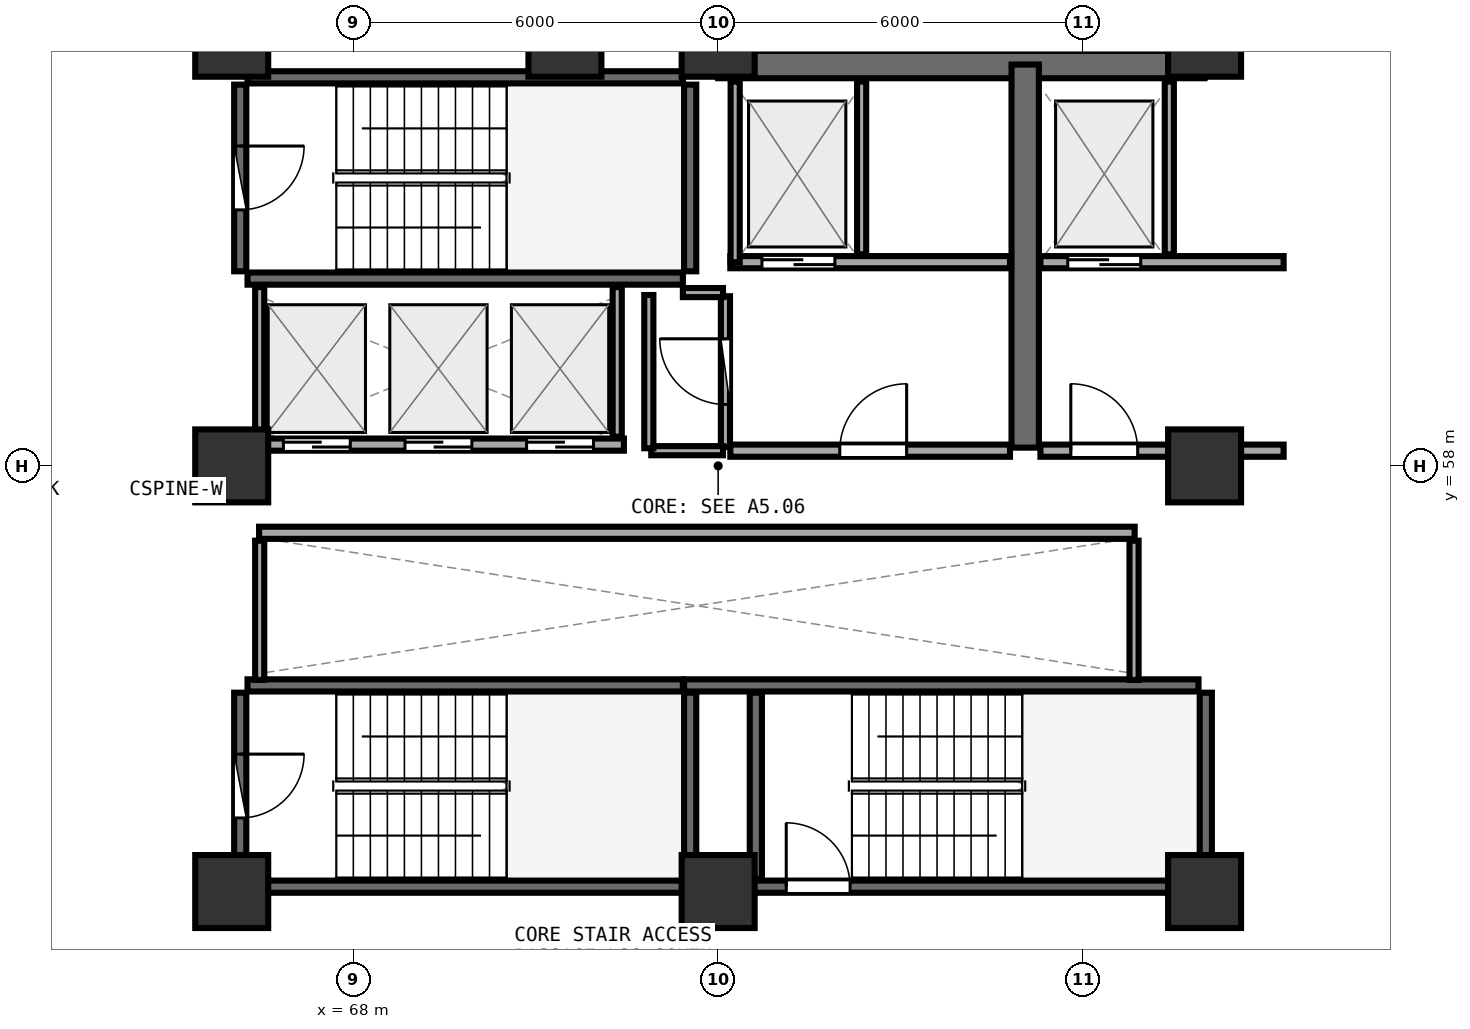
"""IFC4 building model, lengths in metres.
Left out: names, types, materials, properties, quantities, classifications, styles, units other than length and angle.
Written with IfcOpenShell. Run it as: python <this file> out.ifc"""

import sys

from ifc_helpers import new_model, si_unit, direction, frame, frame_2d, origin, origin_2d, place, context, subcontext, project, spatial, rectangle, extrude, element, fill, save


model = new_model("IFC4")
c1 = context("Model", 3, precision=1e-05, world=origin(), true_north=direction((0.0, 1.0)))
c2 = subcontext(c1, "Body", "Model", "MODEL_VIEW")
j1 = project(units=[si_unit("LENGTHUNIT", "METRE"), si_unit("PLANEANGLEUNIT", "RADIAN")], contexts=[c1])
p1 = place(None, origin())
s1 = spatial("IfcSite", under=j1, at=p1, CompositionType="ELEMENT")
p2 = place(p1, origin())
s2 = spatial("IfcBuilding", under=s1, at=p2, CompositionType="ELEMENT")
p3 = place(p2, frame((0.0, 0.0, 110.1)))
s3 = spatial("IfcBuildingStorey", under=s2, at=p3, CompositionType="ELEMENT", Elevation=110.1)
for number, where, z_axis, x_axis in (
    (1, (66.0, 51.0, 0.0), (0.0, 0.0, 1.0), (1.0, 0.0, 0.0)),
    (2, (74.0, 51.0, 0.0), (0.0, 0.0, 1.0), (1.0, 0.0, 0.0)),
    (3, (82.0, 51.0, 0.0), (0.0, 0.0, 1.0), (1.0, 0.0, 0.0)),
    (4, (82.0, 58.0, 0.0), (0.0, 0.0, 1.0), (1.0, 0.0, 0.0)),
    (5, (82.0, 65.0, 0.0), (0.0, 0.0, 1.0), (1.0, 0.0, 0.0)),
    (6, (74.0, 65.0, 0.0), (0.0, 0.0, 1.0), (1.0, 0.0, 0.0)),
    (7, (71.48, 65.0, 0.0), (0.0, 0.0, 1.0), (1.0, 0.0, 0.0)),
    (8, (66.0, 65.0, 0.0), (0.0, 0.0, 1.0), (1.0, 0.0, 0.0)),
    (9, (66.0, 58.0, 0.0), (0.0, 0.0, 1.0), (1.0, 0.0, 0.0)),
):
    element("IfcColumn", number, at=place(p3, frame(where, z_axis=z_axis, x_axis=x_axis)), inside=s3, PredefinedType="PILASTER", context=c2, shape_type="SweptSolid", body=[
        extrude(rectangle(XDim=1.2, YDim=1.2, at=origin_2d()), origin(), (0.0, 0.0, 1.0), 3.75),
    ])
p4 = place(p3, frame((66.26, 61.08, 0.0), z_axis=(0.0, 0.0, 1.0), x_axis=(1.0, 0.0, 0.0)))
e10 = element("IfcWall", 10, at=p4, inside=s3, PredefinedType="SHEAR", context=c2, shape_type="SweptSolid", body=[
    extrude(rectangle(XDim=7.16, YDim=0.2, at=frame_2d((3.58, 0.0))), origin(), (0.0, 0.0, 1.0), 3.49),
])
p5 = place(p3, frame((73.54, 61.2, 0.0), z_axis=(0.0, 0.0, 1.0), x_axis=(0.0, 1.0, 0.0)))
e11 = element("IfcWall", 11, at=p5, inside=s3, PredefinedType="SHEAR", context=c2, shape_type="SweptSolid", body=[
    extrude(rectangle(XDim=3.07, YDim=0.2, at=frame_2d((1.535, 0.0))), origin(), (0.0, 0.0, 1.0), 3.49),
])
p6 = place(p3, frame((73.42, 64.39, 0.0), z_axis=(0.0, 0.0, 1.0), x_axis=(-1.0, 0.0, 0.0)))
e12 = element("IfcWall", 12, at=p6, inside=s3, PredefinedType="SHEAR", context=c2, shape_type="SweptSolid", body=[
    extrude(rectangle(XDim=7.16, YDim=0.2, at=frame_2d((3.58, 0.0))), origin(), (0.0, 0.0, 1.0), 3.49),
])
p7 = place(p3, frame((66.14, 64.27, 0.0), z_axis=(0.0, 0.0, 1.0), x_axis=(0.0, -1.0, 0.0)))
e13 = element("IfcWall", 13, at=p7, inside=s3, PredefinedType="SHEAR", context=c2, shape_type="SweptSolid", body=[
    extrude(rectangle(XDim=3.07, YDim=0.2, at=frame_2d((1.535, 0.0))), origin(), (0.0, 0.0, 1.0), 3.49),
])
p8 = place(p7, frame((1.01, 0.0, 0.0)))
e14 = element("IfcOpeningElement", 14, at=p8, cuts=e13, PredefinedType="OPENING", context=c2, shape_type="SweptSolid", body=[
    extrude(rectangle(XDim=1.05, YDim=2.1, at=frame_2d((0.525, 1.05))), frame((0.0, 0.11, 0.0), z_axis=(0.0, -1.0, 0.0), x_axis=(1.0, 0.0, 0.0)), (0.0, 0.0, 1.0), 0.22),
])
p9 = place(p3, frame((74.0, 51.08, 0.0), z_axis=(0.0, 0.0, 1.0), x_axis=(1.0, 0.0, 0.0)))
e15 = element("IfcWall", 15, at=p9, inside=s3, PredefinedType="SHEAR", context=c2, shape_type="SweptSolid", body=[
    extrude(rectangle(XDim=7.9, YDim=0.2, at=frame_2d((3.95, 0.0))), origin(), (0.0, 0.0, 1.0), 3.49),
])
p10 = place(p9, frame((1.12, 0.0, 0.0)))
e16 = element("IfcOpeningElement", 16, at=p10, cuts=e15, PredefinedType="OPENING", context=c2, shape_type="SweptSolid", body=[
    extrude(rectangle(XDim=1.05, YDim=2.1, at=frame_2d((0.525, 1.05))), frame((0.0, 0.11, 0.0), z_axis=(0.0, -1.0, 0.0), x_axis=(1.0, 0.0, 0.0)), (0.0, 0.0, 1.0), 0.22),
])
p11 = place(p3, frame((82.02, 51.2, 0.0), z_axis=(0.0, 0.0, 1.0), x_axis=(0.0, 1.0, 0.0)))
e17 = element("IfcWall", 17, at=p11, inside=s3, PredefinedType="SHEAR", context=c2, shape_type="SweptSolid", body=[
    extrude(rectangle(XDim=3.07, YDim=0.2, at=frame_2d((1.535, 0.0))), origin(), (0.0, 0.0, 1.0), 3.49),
])
p12 = place(p3, frame((81.9, 54.39, 0.0), z_axis=(0.0, 0.0, 1.0), x_axis=(-1.0, 0.0, 0.0)))
e18 = element("IfcWall", 18, at=p12, inside=s3, PredefinedType="SHEAR", context=c2, shape_type="SweptSolid", body=[
    extrude(rectangle(XDim=8.46, YDim=0.2, at=frame_2d((4.23, 0.0))), origin(), (0.0, 0.0, 1.0), 3.49),
])
p13 = place(p3, frame((74.62, 54.27, 0.0), z_axis=(0.0, 0.0, 1.0), x_axis=(0.0, -1.0, 0.0)))
e19 = element("IfcWall", 19, at=p13, inside=s3, PredefinedType="SHEAR", context=c2, shape_type="SweptSolid", body=[
    extrude(rectangle(XDim=3.07, YDim=0.2, at=frame_2d((1.535, 0.0))), origin(), (0.0, 0.0, 1.0), 3.49),
])
p14 = place(p3, frame((66.26, 51.08, 0.0), z_axis=(0.0, 0.0, 1.0), x_axis=(1.0, 0.0, 0.0)))
e20 = element("IfcWall", 20, at=p14, inside=s3, PredefinedType="SHEAR", context=c2, shape_type="SweptSolid", body=[
    extrude(rectangle(XDim=7.16, YDim=0.2, at=frame_2d((3.58, 0.0))), origin(), (0.0, 0.0, 1.0), 3.49),
])
p15 = place(p3, frame((73.54, 51.2, 0.0), z_axis=(0.0, 0.0, 1.0), x_axis=(0.0, 1.0, 0.0)))
e21 = element("IfcWall", 21, at=p15, inside=s3, PredefinedType="SHEAR", context=c2, shape_type="SweptSolid", body=[
    extrude(rectangle(XDim=3.07, YDim=0.2, at=frame_2d((1.535, 0.0))), origin(), (0.0, 0.0, 1.0), 3.49),
])
p16 = place(p3, frame((73.42, 54.39, 0.0), z_axis=(0.0, 0.0, 1.0), x_axis=(-1.0, 0.0, 0.0)))
e22 = element("IfcWall", 22, at=p16, inside=s3, PredefinedType="SHEAR", context=c2, shape_type="SweptSolid", body=[
    extrude(rectangle(XDim=7.16, YDim=0.2, at=frame_2d((3.58, 0.0))), origin(), (0.0, 0.0, 1.0), 3.49),
])
p17 = place(p3, frame((66.14, 54.27, 0.0), z_axis=(0.0, 0.0, 1.0), x_axis=(0.0, -1.0, 0.0)))
e23 = element("IfcWall", 23, at=p17, inside=s3, PredefinedType="SHEAR", context=c2, shape_type="SweptSolid", body=[
    extrude(rectangle(XDim=3.07, YDim=0.2, at=frame_2d((1.535, 0.0))), origin(), (0.0, 0.0, 1.0), 3.49),
])
p18 = place(p17, frame((1.01, 0.0, 0.0)))
e24 = element("IfcOpeningElement", 24, at=p18, cuts=e23, PredefinedType="OPENING", context=c2, shape_type="SweptSolid", body=[
    extrude(rectangle(XDim=1.05, YDim=2.1, at=frame_2d((0.525, 1.05))), frame((0.0, 0.11, 0.0), z_axis=(0.0, -1.0, 0.0), x_axis=(1.0, 0.0, 0.0)), (0.0, 0.0, 1.0), 0.22),
])
p19 = place(p3, frame((74.0, 64.6, 0.0), z_axis=(0.0, 0.0, 1.0), x_axis=(1.0, 0.0, 0.0)))
e25 = element("IfcWall", 25, at=p19, inside=s3, PredefinedType="SHEAR", context=c2, shape_type="SweptSolid", body=[
    extrude(rectangle(XDim=8.0, YDim=0.45, at=frame_2d((4.0, 0.0))), origin(), (0.0, 0.0, 1.0), 3.49),
])
p20 = place(p3, frame((79.05, 58.3, 0.0), z_axis=(0.0, 0.0, 1.0), x_axis=(0.0, 1.0, 0.0)))
e26 = element("IfcWall", 26, at=p20, inside=s3, PredefinedType="SHEAR", context=c2, shape_type="SweptSolid", body=[
    extrude(rectangle(XDim=6.3, YDim=0.45, at=frame_2d((3.15, 0.0))), origin(), (0.0, 0.0, 1.0), 3.49),
])
p21 = place(p3, frame((74.2, 61.35, 0.0), z_axis=(0.0, 0.0, 1.0), x_axis=(1.0, 0.0, 0.0)))
e27 = element("IfcWall", 27, at=p21, inside=s3, PredefinedType="SOLIDWALL", context=c2, shape_type="SweptSolid", body=[
    extrude(rectangle(XDim=4.6, YDim=0.2, at=frame_2d((2.3, 0.0))), origin(), (0.0, 0.0, 1.0), 3.48),
])
p22 = place(p21, frame((0.52, 0.0, 0.0)))
e28 = element("IfcOpeningElement", 28, at=p22, cuts=e27, PredefinedType="OPENING", context=c2, shape_type="SweptSolid", body=[
    extrude(rectangle(XDim=1.2, YDim=2.15, at=frame_2d((0.6, 1.075))), frame((0.0, 0.11, 0.0), z_axis=(0.0, -1.0, 0.0), x_axis=(1.0, 0.0, 0.0)), (0.0, 0.0, 1.0), 0.22),
])
p23 = place(p3, frame((74.28, 61.35, 0.0), z_axis=(0.0, 0.0, 1.0), x_axis=(0.0, 1.0, 0.0)))
e29 = element("IfcWall", 29, at=p23, inside=s3, PredefinedType="PARTITIONING", context=c2, shape_type="SweptSolid", body=[
    extrude(rectangle(XDim=2.97, YDim=0.15, at=frame_2d((1.485, 0.0))), origin(), (0.0, 0.0, 1.0), 3.48),
])
p24 = place(p3, frame((76.36, 61.48, 0.0), z_axis=(0.0, 0.0, 1.0), x_axis=(0.0, 1.0, 0.0)))
e30 = element("IfcWall", 30, at=p24, inside=s3, PredefinedType="PARTITIONING", context=c2, shape_type="SweptSolid", body=[
    extrude(rectangle(XDim=2.84, YDim=0.15, at=frame_2d((1.42, 0.0))), origin(), (0.0, 0.0, 1.0), 3.48),
])
p25 = place(p3, frame((79.3, 61.35, 0.0), z_axis=(0.0, 0.0, 1.0), x_axis=(1.0, 0.0, 0.0)))
e31 = element("IfcWall", 31, at=p25, inside=s3, PredefinedType="SOLIDWALL", context=c2, shape_type="SweptSolid", body=[
    extrude(rectangle(XDim=4.0, YDim=0.2, at=frame_2d((2.0, 0.0))), origin(), (0.0, 0.0, 1.0), 2.775),
])
p26 = place(p25, frame((0.45, 0.0, 0.0)))
e32 = element("IfcOpeningElement", 32, at=p26, cuts=e31, PredefinedType="OPENING", context=c2, shape_type="SweptSolid", body=[
    extrude(rectangle(XDim=1.2, YDim=2.15, at=frame_2d((0.6, 1.075))), frame((0.0, 0.11, 0.0), z_axis=(0.0, -1.0, 0.0), x_axis=(1.0, 0.0, 0.0)), (0.0, 0.0, 1.0), 0.22),
])
p27 = place(p3, frame((81.42, 61.48, 0.0), z_axis=(0.0, 0.0, 1.0), x_axis=(0.0, 1.0, 0.0)))
e33 = element("IfcWall", 33, at=p27, inside=s3, PredefinedType="PARTITIONING", context=c2, shape_type="SweptSolid", body=[
    extrude(rectangle(XDim=2.84, YDim=0.15, at=frame_2d((1.42, 0.0))), origin(), (0.0, 0.0, 1.0), 3.48),
])
p28 = place(p3, frame((74.2, 58.25, 0.0), z_axis=(0.0, 0.0, 1.0), x_axis=(1.0, 0.0, 0.0)))
e34 = element("IfcWall", 34, at=p28, inside=s3, PredefinedType="SOLIDWALL", context=c2, shape_type="SweptSolid", body=[
    extrude(rectangle(XDim=4.6, YDim=0.2, at=frame_2d((2.3, 0.0))), origin(), (0.0, 0.0, 1.0), 3.48),
])
p29 = place(p28, frame((1.8, 0.0, 0.0)))
e35 = element("IfcOpeningElement", 35, at=p29, cuts=e34, PredefinedType="OPENING", context=c2, shape_type="SweptSolid", body=[
    extrude(rectangle(XDim=1.1, YDim=2.1, at=frame_2d((0.55, 1.05))), frame((0.0, 0.11, 0.0), z_axis=(0.0, -1.0, 0.0), x_axis=(1.0, 0.0, 0.0)), (0.0, 0.0, 1.0), 0.22),
])
p30 = place(p3, frame((79.3, 58.25, 0.0), z_axis=(0.0, 0.0, 1.0), x_axis=(1.0, 0.0, 0.0)))
e36 = element("IfcWall", 36, at=p30, inside=s3, PredefinedType="SOLIDWALL", context=c2, shape_type="SweptSolid", body=[
    extrude(rectangle(XDim=4.0, YDim=0.2, at=frame_2d((2.0, 0.0))), origin(), (0.0, 0.0, 1.0), 2.775),
])
p31 = place(p30, frame((0.5, 0.0, 0.0)))
e37 = element("IfcOpeningElement", 37, at=p31, cuts=e36, PredefinedType="OPENING", context=c2, shape_type="SweptSolid", body=[
    extrude(rectangle(XDim=1.1, YDim=2.1, at=frame_2d((0.55, 1.05))), frame((0.0, 0.11, 0.0), z_axis=(0.0, -1.0, 0.0), x_axis=(1.0, 0.0, 0.0)), (0.0, 0.0, 1.0), 0.22),
])
p32 = place(p3, frame((66.45, 58.35, 0.0), z_axis=(0.0, 0.0, 1.0), x_axis=(1.0, 0.0, 0.0)))
e38 = element("IfcWall", 38, at=p32, inside=s3, PredefinedType="SOLIDWALL", context=c2, shape_type="SweptSolid", body=[
    extrude(rectangle(XDim=6.0, YDim=0.2, at=frame_2d((3.0, 0.0))), origin(), (0.0, 0.0, 1.0), 3.48),
])
p33 = place(p32, frame((0.4, 0.0, 0.0)))
e39 = element("IfcOpeningElement", 39, at=p33, cuts=e38, PredefinedType="OPENING", context=c2, shape_type="SweptSolid", body=[
    extrude(rectangle(XDim=1.1, YDim=2.1, at=frame_2d((0.55, 1.05))), frame((0.0, 0.11, 0.0), z_axis=(0.0, -1.0, 0.0), x_axis=(1.0, 0.0, 0.0)), (0.0, 0.0, 1.0), 0.22),
])
p34 = place(p32, frame((2.4, 0.0, 0.0)))
e40 = element("IfcOpeningElement", 40, at=p34, cuts=e38, PredefinedType="OPENING", context=c2, shape_type="SweptSolid", body=[
    extrude(rectangle(XDim=1.1, YDim=2.1, at=frame_2d((0.55, 1.05))), frame((0.0, 0.11, 0.0), z_axis=(0.0, -1.0, 0.0), x_axis=(1.0, 0.0, 0.0)), (0.0, 0.0, 1.0), 0.22),
])
p35 = place(p32, frame((4.4, 0.0, 0.0)))
e41 = element("IfcOpeningElement", 41, at=p35, cuts=e38, PredefinedType="OPENING", context=c2, shape_type="SweptSolid", body=[
    extrude(rectangle(XDim=1.1, YDim=2.1, at=frame_2d((0.55, 1.05))), frame((0.0, 0.11, 0.0), z_axis=(0.0, -1.0, 0.0), x_axis=(1.0, 0.0, 0.0)), (0.0, 0.0, 1.0), 0.22),
])
for number, where, z_axis, x_axis in (
    (42, (66.46, 58.48, 0.0), (0.0, 0.0, 1.0), (0.0, 1.0, 0.0)),
    (43, (72.34, 58.48, 0.0), (0.0, 0.0, 1.0), (0.0, 1.0, 0.0)),
):
    element("IfcWall", number, at=place(p3, frame(where, z_axis=z_axis, x_axis=x_axis)), inside=s3, PredefinedType="PARTITIONING", context=c2, shape_type="SweptSolid", body=[
        extrude(rectangle(XDim=2.46, YDim=0.15, at=frame_2d((1.23, 0.0))), origin(), (0.0, 0.0, 1.0), 3.48),
    ])
p36 = place(p3, frame((66.45, 56.9, 0.0), z_axis=(0.0, 0.0, 1.0), x_axis=(1.0, 0.0, 0.0)))
e44 = element("IfcWall", 44, at=p36, inside=s3, PredefinedType="SOLIDWALL", context=c2, shape_type="SweptSolid", body=[
    extrude(rectangle(XDim=14.4, YDim=0.2, at=frame_2d((7.2, 0.0))), origin(), (0.0, 0.0, 1.0), 3.48),
])
for number, where, z_axis, x_axis in (
    (45, (66.46, 54.48, 0.0), (0.0, 0.0, 1.0), (0.0, 1.0, 0.0)),
    (46, (80.84, 54.48, 0.0), (0.0, 0.0, 1.0), (0.0, 1.0, 0.0)),
):
    element("IfcWall", number, at=place(p3, frame(where, z_axis=z_axis, x_axis=x_axis)), inside=s3, PredefinedType="PARTITIONING", context=c2, shape_type="SweptSolid", body=[
        extrude(rectangle(XDim=2.29, YDim=0.15, at=frame_2d((1.145, 0.0))), origin(), (0.0, 0.0, 1.0), 3.48),
    ])
p37 = place(p3, frame((74.12, 58.31, 0.0), z_axis=(0.0, 0.0, 1.0), x_axis=(0.0, 1.0, 0.0)))
e47 = element("IfcWall", 47, at=p37, inside=s3, PredefinedType="PARTITIONING", context=c2, shape_type="SweptSolid", body=[
    extrude(rectangle(XDim=2.48, YDim=0.15, at=frame_2d((1.24, 0.0))), origin(), (0.0, 0.0, 1.0), 3.48),
])
p38 = place(p37, frame((0.7, 0.0, 0.0)))
e48 = element("IfcOpeningElement", 48, at=p38, cuts=e47, PredefinedType="OPENING", context=c2, shape_type="SweptSolid", body=[
    extrude(rectangle(XDim=1.08, YDim=2.1, at=frame_2d((0.54, 1.05))), frame((0.0, 0.085, 0.0), z_axis=(0.0, -1.0, 0.0), x_axis=(1.0, 0.0, 0.0)), (0.0, 0.0, 1.0), 0.17),
])
p39 = place(p3, frame((63.687, 67.9, 0.0), z_axis=(0.0, 0.0, 1.0), x_axis=(-0.628221381111, -0.778034636963, 0.0)))
e49 = element("IfcWall", 49, at=p39, inside=s3, PredefinedType="PARTITIONING", context=c2, shape_type="SweptSolid", body=[
    extrude(rectangle(XDim=5.107, YDim=0.12, at=frame_2d((2.554, 0.0))), origin(), (0.0, 0.0, 1.0), 2.925),
])
p40 = place(p39, frame((2.104, 0.0, 0.0)))
e50 = element("IfcOpeningElement", 50, at=p40, cuts=e49, PredefinedType="OPENING", context=c2, shape_type="SweptSolid", body=[
    extrude(rectangle(XDim=0.9, YDim=2.08, at=frame_2d((0.45, 1.04))), frame((0.0, 0.07, 0.0), z_axis=(0.0, -1.0, 0.0), x_axis=(1.0, 0.0, 0.0)), (0.0, 0.0, 1.0), 0.14),
])
p41 = place(p3, frame((72.9, 58.25, 0.0), z_axis=(0.0, 0.0, 1.0), x_axis=(1.0, 0.0, 0.0)))
e51 = element("IfcWall", 51, at=p41, inside=s3, PredefinedType="PARTITIONING", context=c2, shape_type="SweptSolid", body=[
    extrude(rectangle(XDim=1.18, YDim=0.15, at=frame_2d((0.59, 0.0))), origin(), (0.0, 0.0, 1.0), 3.48),
])
p42 = place(p3, frame((74.08, 60.85, 0.0), z_axis=(0.0, 0.0, 1.0), x_axis=(-1.0, 0.0, 0.0)))
e52 = element("IfcWall", 52, at=p42, inside=s3, PredefinedType="PARTITIONING", context=c2, shape_type="SweptSolid", body=[
    extrude(rectangle(XDim=0.66, YDim=0.15, at=frame_2d((0.33, 0.0))), origin(), (0.0, 0.0, 1.0), 3.48),
])
p43 = place(p3, frame((72.86, 60.81, 0.0), z_axis=(0.0, 0.0, 1.0), x_axis=(0.0, -1.0, 0.0)))
e53 = element("IfcWall", 53, at=p43, inside=s3, PredefinedType="PARTITIONING", context=c2, shape_type="SweptSolid", body=[
    extrude(rectangle(XDim=2.52, YDim=0.15, at=frame_2d((1.26, 0.0))), origin(), (0.0, 0.0, 1.0), 3.48),
])
p44 = place(p8, origin())
e54 = element("IfcDoor", 54, at=p44, inside=s3, OperationType="SINGLE_SWING_LEFT", PredefinedType="DOOR", context=c2, shape_type="SweptSolid", body=[
    extrude(rectangle(XDim=1.05, YDim=2.1, at=frame_2d((0.525, 1.05))), frame((0.0, 0.025, 0.0), z_axis=(0.0, -1.0, 0.0), x_axis=(1.0, 0.0, 0.0)), (0.0, 0.0, 1.0), 0.05),
])
fill(e14, e54)
p45 = place(p10, origin())
e55 = element("IfcDoor", 55, at=p45, inside=s3, OperationType="SINGLE_SWING_LEFT", PredefinedType="DOOR", context=c2, shape_type="SweptSolid", body=[
    extrude(rectangle(XDim=1.05, YDim=2.1, at=frame_2d((0.525, 1.05))), frame((0.0, 0.025, 0.0), z_axis=(0.0, -1.0, 0.0), x_axis=(1.0, 0.0, 0.0)), (0.0, 0.0, 1.0), 0.05),
])
fill(e16, e55)
p46 = place(p18, origin())
e56 = element("IfcDoor", 56, at=p46, inside=s3, OperationType="SINGLE_SWING_LEFT", PredefinedType="DOOR", context=c2, shape_type="SweptSolid", body=[
    extrude(rectangle(XDim=1.05, YDim=2.1, at=frame_2d((0.525, 1.05))), frame((0.0, 0.025, 0.0), z_axis=(0.0, -1.0, 0.0), x_axis=(1.0, 0.0, 0.0)), (0.0, 0.0, 1.0), 0.05),
])
fill(e24, e56)
p47 = place(p22, origin())
e57 = element("IfcDoor", 57, at=p47, inside=s3, OperationType="DOUBLE_DOOR_SLIDING", PredefinedType="DOOR", context=c2, shape_type="SweptSolid", body=[
    extrude(rectangle(XDim=1.2, YDim=2.15, at=frame_2d((0.6, 1.075))), frame((0.0, 0.025, 0.0), z_axis=(0.0, -1.0, 0.0), x_axis=(1.0, 0.0, 0.0)), (0.0, 0.0, 1.0), 0.05),
])
fill(e28, e57)
p48 = place(p26, origin())
e58 = element("IfcDoor", 58, at=p48, inside=s3, OperationType="DOUBLE_DOOR_SLIDING", PredefinedType="DOOR", context=c2, shape_type="SweptSolid", body=[
    extrude(rectangle(XDim=1.2, YDim=2.15, at=frame_2d((0.6, 1.075))), frame((0.0, 0.025, 0.0), z_axis=(0.0, -1.0, 0.0), x_axis=(1.0, 0.0, 0.0)), (0.0, 0.0, 1.0), 0.05),
])
fill(e32, e58)
p49 = place(p29, frame((1.1, 0.0, 0.0), z_axis=(0.0, 0.0, 1.0), x_axis=(-1.0, 0.0, 0.0)))
e59 = element("IfcDoor", 59, at=p49, inside=s3, OperationType="SINGLE_SWING_LEFT", PredefinedType="DOOR", context=c2, shape_type="SweptSolid", body=[
    extrude(rectangle(XDim=1.1, YDim=2.1, at=frame_2d((0.55, 1.05))), frame((0.0, 0.025, 0.0), z_axis=(0.0, -1.0, 0.0), x_axis=(1.0, 0.0, 0.0)), (0.0, 0.0, 1.0), 0.05),
])
fill(e35, e59)
p50 = place(p31, frame((1.1, 0.0, 0.0), z_axis=(0.0, 0.0, 1.0), x_axis=(-1.0, 0.0, 0.0)))
e60 = element("IfcDoor", 60, at=p50, inside=s3, OperationType="SINGLE_SWING_RIGHT", PredefinedType="DOOR", context=c2, shape_type="SweptSolid", body=[
    extrude(rectangle(XDim=1.1, YDim=2.1, at=frame_2d((0.55, 1.05))), frame((0.0, 0.025, 0.0), z_axis=(0.0, -1.0, 0.0), x_axis=(1.0, 0.0, 0.0)), (0.0, 0.0, 1.0), 0.05),
])
fill(e37, e60)
p51 = place(p33, origin())
e61 = element("IfcDoor", 61, at=p51, inside=s3, OperationType="DOUBLE_DOOR_SLIDING", PredefinedType="DOOR", context=c2, shape_type="SweptSolid", body=[
    extrude(rectangle(XDim=1.1, YDim=2.1, at=frame_2d((0.55, 1.05))), frame((0.0, 0.025, 0.0), z_axis=(0.0, -1.0, 0.0), x_axis=(1.0, 0.0, 0.0)), (0.0, 0.0, 1.0), 0.05),
])
fill(e39, e61)
p52 = place(p34, origin())
e62 = element("IfcDoor", 62, at=p52, inside=s3, OperationType="DOUBLE_DOOR_SLIDING", PredefinedType="DOOR", context=c2, shape_type="SweptSolid", body=[
    extrude(rectangle(XDim=1.1, YDim=2.1, at=frame_2d((0.55, 1.05))), frame((0.0, 0.025, 0.0), z_axis=(0.0, -1.0, 0.0), x_axis=(1.0, 0.0, 0.0)), (0.0, 0.0, 1.0), 0.05),
])
fill(e40, e62)
p53 = place(p35, origin())
e63 = element("IfcDoor", 63, at=p53, inside=s3, OperationType="DOUBLE_DOOR_SLIDING", PredefinedType="DOOR", context=c2, shape_type="SweptSolid", body=[
    extrude(rectangle(XDim=1.1, YDim=2.1, at=frame_2d((0.55, 1.05))), frame((0.0, 0.025, 0.0), z_axis=(0.0, -1.0, 0.0), x_axis=(1.0, 0.0, 0.0)), (0.0, 0.0, 1.0), 0.05),
])
fill(e41, e63)
p54 = place(p38, origin())
e64 = element("IfcDoor", 64, at=p54, inside=s3, OperationType="SINGLE_SWING_RIGHT", PredefinedType="DOOR", context=c2, shape_type="SweptSolid", body=[
    extrude(rectangle(XDim=1.08, YDim=2.1, at=frame_2d((0.54, 1.05))), frame((0.0, 0.025, 0.0), z_axis=(0.0, -1.0, 0.0), x_axis=(1.0, 0.0, 0.0)), (0.0, 0.0, 1.0), 0.05),
])
fill(e48, e64)
save(model, sys.argv[1])
